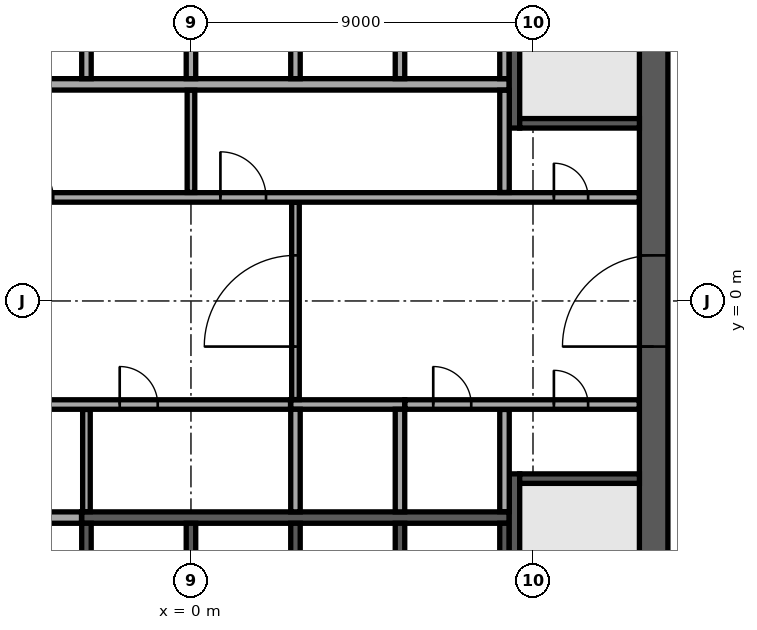
"""IFC4 building model, lengths in metres.
Left out: names, types, materials, properties, quantities, classifications, styles, units other than length and angle.
Written with IfcOpenShell. Run it as: python <this file> out.ifc"""

import sys

from ifc_helpers import new_model, si_unit, direction, frame, frame_2d, origin, place, context, subcontext, project, spatial, rectangle, extrude, element, fill, save


model = new_model("IFC4")
c1 = context("Model", 3, precision=1e-05, world=origin(), true_north=direction((0.0, 1.0)))
c2 = subcontext(c1, "Body", "Model", "MODEL_VIEW")
j1 = project(units=[si_unit("LENGTHUNIT", "METRE"), si_unit("PLANEANGLEUNIT", "RADIAN")], contexts=[c1])
p1 = place(None, origin())
s1 = spatial("IfcSite", under=j1, at=p1, CompositionType="ELEMENT")
p2 = place(p1, origin())
s2 = spatial("IfcBuilding", under=s1, at=p2, CompositionType="ELEMENT")
p3 = place(p2, frame((0.0, 0.0, 282.9)))
s3 = spatial("IfcBuildingStorey", under=s2, at=p3, CompositionType="ELEMENT", Elevation=282.9)
p4 = place(p3, frame((12.175, -11.8, 0.0), z_axis=(0.0, 0.0, 1.0), x_axis=(0.0, 1.0, 0.0)))
e1 = element("IfcWall", 1, at=p4, inside=s3, PredefinedType="SHEAR", context=c2, shape_type="SweptSolid", body=[
    extrude(rectangle(XDim=23.6, YDim=0.75, at=frame_2d((11.8, 0.0))), origin(), (0.0, 0.0, 1.0), 3.64),
])
p5 = place(p4, frame((10.6, 0.0, 0.0)))
e2 = element("IfcOpeningElement", 2, at=p5, cuts=e1, PredefinedType="OPENING", context=c2, shape_type="SweptSolid", body=[
    extrude(rectangle(XDim=2.4, YDim=2.4, at=frame_2d((1.2, 1.2))), frame((0.0, 0.385, 0.0), z_axis=(0.0, -1.0, 0.0), x_axis=(1.0, 0.0, 0.0)), (0.0, 0.0, 1.0), 0.77),
])
p6 = place(p3, frame((-8.375, 5.7, 0.0), z_axis=(0.0, 0.0, 1.0), x_axis=(1.0, 0.0, 0.0)))
e3 = element("IfcWall", 3, at=p6, inside=s3, PredefinedType="SOLIDWALL", context=c2, shape_type="SweptSolid", body=[
    extrude(rectangle(XDim=16.75, YDim=0.3, at=frame_2d((8.375, 0.0))), origin(), (0.0, 0.0, 1.0), 3.64),
])
p7 = place(p3, frame((-2.875, -5.7, 0.0), z_axis=(0.0, 0.0, 1.0), x_axis=(1.0, 0.0, 0.0)))
e4 = element("IfcWall", 4, at=p7, inside=s3, PredefinedType="SOLIDWALL", context=c2, shape_type="SweptSolid", body=[
    extrude(rectangle(XDim=11.25, YDim=0.3, at=frame_2d((5.625, 0.0))), origin(), (0.0, 0.0, 1.0), 3.64),
])
for number, where, z_axis, x_axis in (
    (5, (-2.75, 5.85, 0.0), (0.0, 0.0, 1.0), (0.0, 1.0, 0.0)),
    (6, (0.0, 5.85, 0.0), (0.0, 0.0, 1.0), (0.0, 1.0, 0.0)),
    (7, (2.75, 5.85, 0.0), (0.0, 0.0, 1.0), (0.0, 1.0, 0.0)),
    (8, (5.5, 5.85, 0.0), (0.0, 0.0, 1.0), (0.0, 1.0, 0.0)),
    (9, (8.25, 5.85, 0.0), (0.0, 0.0, 1.0), (0.0, 1.0, 0.0)),
):
    element("IfcWall", number, at=place(p3, frame(where, z_axis=z_axis, x_axis=x_axis)), inside=s3, PredefinedType="SOLIDWALL", context=c2, shape_type="SweptSolid", body=[
        extrude(rectangle(XDim=2.7, YDim=0.25, at=frame_2d((1.35, 0.0))), origin(), (0.0, 0.0, 1.0), 3.64),
    ])
p8 = place(p3, frame((2.625, -2.725, 0.0), z_axis=(0.0, 0.0, 1.0), x_axis=(1.0, 0.0, 0.0)))
e10 = element("IfcWall", 10, at=p8, inside=s3, PredefinedType="SOLIDWALL", context=c2, shape_type="SweptSolid", body=[
    extrude(rectangle(XDim=3.0, YDim=0.25, at=frame_2d((1.5, 0.0))), origin(), (0.0, 0.0, 1.0), 3.64),
])
for number, where, z_axis, x_axis in (
    (11, (2.75, -5.55, 0.0), (0.0, 0.0, 1.0), (0.0, 1.0, 0.0)),
    (12, (5.5, -5.55, 0.0), (0.0, 0.0, 1.0), (0.0, 1.0, 0.0)),
    (13, (-2.75, -8.55, 0.0), (0.0, 0.0, 1.0), (0.0, 1.0, 0.0)),
    (14, (0.0, -8.55, 0.0), (0.0, 0.0, 1.0), (0.0, 1.0, 0.0)),
    (15, (2.75, -8.55, 0.0), (0.0, 0.0, 1.0), (0.0, 1.0, 0.0)),
    (16, (5.5, -8.55, 0.0), (0.0, 0.0, 1.0), (0.0, 1.0, 0.0)),
    (17, (8.25, -8.55, 0.0), (0.0, 0.0, 1.0), (0.0, 1.0, 0.0)),
):
    element("IfcWall", number, at=place(p3, frame(where, z_axis=z_axis, x_axis=x_axis)), inside=s3, PredefinedType="SOLIDWALL", context=c2, shape_type="SweptSolid", body=[
        extrude(rectangle(XDim=2.7, YDim=0.25, at=frame_2d((1.35, 0.0))), origin(), (0.0, 0.0, 1.0), 3.64),
    ])
p9 = place(p3, frame((8.512, 4.55, 0.0), z_axis=(0.0, 0.0, 1.0), x_axis=(0.0, 1.0, 0.0)))
e18 = element("IfcWall", 18, at=p9, inside=s3, PredefinedType="SOLIDWALL", context=c2, shape_type="SweptSolid", body=[
    extrude(rectangle(XDim=7.25, YDim=0.275, at=frame_2d((3.625, 0.0))), origin(), (0.0, 0.0, 1.0), 3.64),
])
p10 = place(p9, frame((6.0, 0.0, 0.0)))
e19 = element("IfcOpeningElement", 19, at=p10, cuts=e18, PredefinedType="OPENING", context=c2, shape_type="SweptSolid", body=[
    extrude(rectangle(XDim=1.0, YDim=2.1, at=frame_2d((0.5, 1.05))), frame((0.0, 0.147, 0.0), z_axis=(0.0, -1.0, 0.0), x_axis=(1.0, 0.0, 0.0)), (0.0, 0.0, 1.0), 0.295),
])
p11 = place(p3, frame((8.65, 4.675, 0.0), z_axis=(0.0, 0.0, 1.0), x_axis=(1.0, 0.0, 0.0)))
e20 = element("IfcWall", 20, at=p11, inside=s3, PredefinedType="SOLIDWALL", context=c2, shape_type="SweptSolid", body=[
    extrude(rectangle(XDim=3.15, YDim=0.25, at=frame_2d((1.575, 0.0))), origin(), (0.0, 0.0, 1.0), 3.64),
])
p12 = place(p3, frame((8.512, -4.55, 0.0), z_axis=(0.0, 0.0, 1.0), x_axis=(0.0, -1.0, 0.0)))
e21 = element("IfcWall", 21, at=p12, inside=s3, PredefinedType="SOLIDWALL", context=c2, shape_type="SweptSolid", body=[
    extrude(rectangle(XDim=7.25, YDim=0.275, at=frame_2d((3.625, 0.0))), origin(), (0.0, 0.0, 1.0), 3.64),
])
p13 = place(p12, frame((6.0, 0.0, 0.0)))
e22 = element("IfcOpeningElement", 22, at=p13, cuts=e21, PredefinedType="OPENING", context=c2, shape_type="SweptSolid", body=[
    extrude(rectangle(XDim=1.0, YDim=2.1, at=frame_2d((0.5, 1.05))), frame((0.0, 0.147, 0.0), z_axis=(0.0, -1.0, 0.0), x_axis=(1.0, 0.0, 0.0)), (0.0, 0.0, 1.0), 0.295),
])
p14 = place(p3, frame((8.65, -4.675, 0.0), z_axis=(0.0, 0.0, 1.0), x_axis=(1.0, 0.0, 0.0)))
e23 = element("IfcWall", 23, at=p14, inside=s3, PredefinedType="SOLIDWALL", context=c2, shape_type="SweptSolid", body=[
    extrude(rectangle(XDim=3.15, YDim=0.25, at=frame_2d((1.575, 0.0))), origin(), (0.0, 0.0, 1.0), 3.64),
])
p15 = place(p3, frame((-8.35, -5.7, 0.0), z_axis=(0.0, 0.0, 1.0), x_axis=(1.0, 0.0, 0.0)))
e24 = element("IfcWall", 24, at=p15, inside=s3, PredefinedType="PARTITIONING", context=c2, shape_type="SweptSolid", body=[
    extrude(rectangle(XDim=5.47, YDim=0.3, at=frame_2d((2.735, 0.0))), origin(), (0.0, 0.0, 1.0), 3.64),
])
p16 = place(p3, frame((-2.75, -5.545, 0.0), z_axis=(0.0, 0.0, 1.0), x_axis=(0.0, 1.0, 0.0)))
e25 = element("IfcWall", 25, at=p16, inside=s3, PredefinedType="PARTITIONING", context=c2, shape_type="SweptSolid", body=[
    extrude(rectangle(XDim=2.69, YDim=0.2, at=frame_2d((1.345, 0.0))), origin(), (0.0, 0.0, 1.0), 3.64),
])
p17 = place(p3, frame((8.25, -5.545, 0.0), z_axis=(0.0, 0.0, 1.0), x_axis=(0.0, 1.0, 0.0)))
e26 = element("IfcWall", 26, at=p17, inside=s3, PredefinedType="PARTITIONING", context=c2, shape_type="SweptSolid", body=[
    extrude(rectangle(XDim=2.69, YDim=0.25, at=frame_2d((1.345, 0.0))), origin(), (0.0, 0.0, 1.0), 3.64),
])
p18 = place(p3, frame((-11.795, -2.725, 0.0), z_axis=(0.0, 0.0, 1.0), x_axis=(1.0, 0.0, 0.0)))
e27 = element("IfcWall", 27, at=p18, inside=s3, PredefinedType="PARTITIONING", context=c2, shape_type="SweptSolid", body=[
    extrude(rectangle(XDim=14.415, YDim=0.25, at=frame_2d((7.208, 0.0))), origin(), (0.0, 0.0, 1.0), 3.64),
])
p19 = place(p18, frame((1.295, 0.0, 0.0)))
e28 = element("IfcOpeningElement", 28, at=p19, cuts=e27, PredefinedType="OPENING", context=c2, shape_type="SweptSolid", body=[
    extrude(rectangle(XDim=1.0, YDim=2.1, at=frame_2d((0.5, 1.05))), frame((0.0, 0.135, 0.0), z_axis=(0.0, -1.0, 0.0), x_axis=(1.0, 0.0, 0.0)), (0.0, 0.0, 1.0), 0.27),
])
p20 = place(p18, frame((4.42, 0.0, 0.0)))
e29 = element("IfcOpeningElement", 29, at=p20, cuts=e27, PredefinedType="OPENING", context=c2, shape_type="SweptSolid", body=[
    extrude(rectangle(XDim=1.0, YDim=2.1, at=frame_2d((0.5, 1.05))), frame((0.0, 0.135, 0.0), z_axis=(0.0, -1.0, 0.0), x_axis=(1.0, 0.0, 0.0)), (0.0, 0.0, 1.0), 0.27),
])
p21 = place(p18, frame((9.92, 0.0, 0.0)))
e30 = element("IfcOpeningElement", 30, at=p21, cuts=e27, PredefinedType="OPENING", context=c2, shape_type="SweptSolid", body=[
    extrude(rectangle(XDim=1.0, YDim=2.1, at=frame_2d((0.5, 1.05))), frame((0.0, 0.135, 0.0), z_axis=(0.0, -1.0, 0.0), x_axis=(1.0, 0.0, 0.0)), (0.0, 0.0, 1.0), 0.27),
])
p22 = place(p3, frame((5.63, -2.725, 0.0), z_axis=(0.0, 0.0, 1.0), x_axis=(1.0, 0.0, 0.0)))
e31 = element("IfcWall", 31, at=p22, inside=s3, PredefinedType="PARTITIONING", context=c2, shape_type="SweptSolid", body=[
    extrude(rectangle(XDim=6.165, YDim=0.25, at=frame_2d((3.083, 0.0))), origin(), (0.0, 0.0, 1.0), 3.64),
])
p23 = place(p22, frame((0.745, 0.0, 0.0)))
e32 = element("IfcOpeningElement", 32, at=p23, cuts=e31, PredefinedType="OPENING", context=c2, shape_type="SweptSolid", body=[
    extrude(rectangle(XDim=1.0, YDim=2.1, at=frame_2d((0.5, 1.05))), frame((0.0, 0.135, 0.0), z_axis=(0.0, -1.0, 0.0), x_axis=(1.0, 0.0, 0.0)), (0.0, 0.0, 1.0), 0.27),
])
p24 = place(p22, frame((3.92, 0.0, 0.0)))
e33 = element("IfcOpeningElement", 33, at=p24, cuts=e31, PredefinedType="OPENING", context=c2, shape_type="SweptSolid", body=[
    extrude(rectangle(XDim=0.9, YDim=2.1, at=frame_2d((0.45, 1.05))), frame((0.0, 0.135, 0.0), z_axis=(0.0, -1.0, 0.0), x_axis=(1.0, 0.0, 0.0)), (0.0, 0.0, 1.0), 0.27),
])
p25 = place(p3, frame((2.75, -2.595, 0.0), z_axis=(0.0, 0.0, 1.0), x_axis=(0.0, 1.0, 0.0)))
e34 = element("IfcWall", 34, at=p25, inside=s3, PredefinedType="PARTITIONING", context=c2, shape_type="SweptSolid", body=[
    extrude(rectangle(XDim=5.19, YDim=0.2, at=frame_2d((2.595, 0.0))), origin(), (0.0, 0.0, 1.0), 3.64),
])
p26 = place(p25, frame((1.395, 0.0, 0.0)))
e35 = element("IfcOpeningElement", 35, at=p26, cuts=e34, PredefinedType="OPENING", context=c2, shape_type="SweptSolid", body=[
    extrude(rectangle(XDim=2.4, YDim=2.4, at=frame_2d((1.2, 1.2))), frame((0.0, 0.11, 0.0), z_axis=(0.0, -1.0, 0.0), x_axis=(1.0, 0.0, 0.0)), (0.0, 0.0, 1.0), 0.22),
])
p27 = place(p3, frame((-11.795, 2.725, 0.0), z_axis=(0.0, 0.0, 1.0), x_axis=(1.0, 0.0, 0.0)))
e36 = element("IfcWall", 36, at=p27, inside=s3, PredefinedType="PARTITIONING", context=c2, shape_type="SweptSolid", body=[
    extrude(rectangle(XDim=23.59, YDim=0.25, at=frame_2d((11.795, 0.0))), origin(), (0.0, 0.0, 1.0), 3.64),
])
p28 = place(p27, frame((21.345, 0.0, 0.0)))
e37 = element("IfcOpeningElement", 37, at=p28, cuts=e36, PredefinedType="OPENING", context=c2, shape_type="SweptSolid", body=[
    extrude(rectangle(XDim=0.9, YDim=2.1, at=frame_2d((0.45, 1.05))), frame((0.0, 0.135, 0.0), z_axis=(0.0, -1.0, 0.0), x_axis=(1.0, 0.0, 0.0)), (0.0, 0.0, 1.0), 0.27),
])
p29 = place(p27, frame((1.345, 0.0, 0.0)))
e38 = element("IfcOpeningElement", 38, at=p29, cuts=e36, PredefinedType="OPENING", context=c2, shape_type="SweptSolid", body=[
    extrude(rectangle(XDim=0.9, YDim=2.1, at=frame_2d((0.45, 1.05))), frame((0.0, 0.135, 0.0), z_axis=(0.0, -1.0, 0.0), x_axis=(1.0, 0.0, 0.0)), (0.0, 0.0, 1.0), 0.27),
])
p30 = place(p27, frame((4.42, 0.0, 0.0)))
e39 = element("IfcOpeningElement", 39, at=p30, cuts=e36, PredefinedType="OPENING", context=c2, shape_type="SweptSolid", body=[
    extrude(rectangle(XDim=1.0, YDim=2.1, at=frame_2d((0.5, 1.05))), frame((0.0, 0.135, 0.0), z_axis=(0.0, -1.0, 0.0), x_axis=(1.0, 0.0, 0.0)), (0.0, 0.0, 1.0), 0.27),
])
p31 = place(p27, frame((7.17, 0.0, 0.0)))
e40 = element("IfcOpeningElement", 40, at=p31, cuts=e36, PredefinedType="OPENING", context=c2, shape_type="SweptSolid", body=[
    extrude(rectangle(XDim=1.0, YDim=2.1, at=frame_2d((0.5, 1.05))), frame((0.0, 0.135, 0.0), z_axis=(0.0, -1.0, 0.0), x_axis=(1.0, 0.0, 0.0)), (0.0, 0.0, 1.0), 0.27),
])
p32 = place(p27, frame((12.57, 0.0, 0.0)))
e41 = element("IfcOpeningElement", 41, at=p32, cuts=e36, PredefinedType="OPENING", context=c2, shape_type="SweptSolid", body=[
    extrude(rectangle(XDim=1.2, YDim=2.1, at=frame_2d((0.6, 1.05))), frame((0.0, 0.135, 0.0), z_axis=(0.0, -1.0, 0.0), x_axis=(1.0, 0.0, 0.0)), (0.0, 0.0, 1.0), 0.27),
])
p33 = place(p3, frame((0.0, 2.855, 0.0), z_axis=(0.0, 0.0, 1.0), x_axis=(0.0, 1.0, 0.0)))
e42 = element("IfcWall", 42, at=p33, inside=s3, PredefinedType="PARTITIONING", context=c2, shape_type="SweptSolid", body=[
    extrude(rectangle(XDim=2.69, YDim=0.2, at=frame_2d((1.345, 0.0))), origin(), (0.0, 0.0, 1.0), 3.64),
])
p34 = place(p3, frame((8.25, 2.855, 0.0), z_axis=(0.0, 0.0, 1.0), x_axis=(0.0, 1.0, 0.0)))
e43 = element("IfcWall", 43, at=p34, inside=s3, PredefinedType="PARTITIONING", context=c2, shape_type="SweptSolid", body=[
    extrude(rectangle(XDim=2.69, YDim=0.25, at=frame_2d((1.345, 0.0))), origin(), (0.0, 0.0, 1.0), 3.64),
])
p35 = place(p3, frame((10.36, -32.137, 0.0), z_axis=(0.0, 0.0, 1.0), x_axis=(0.438372256832, 0.898793504894, 0.0)))
e44 = element("IfcWall", 44, at=p35, inside=s3, PredefinedType="STANDARD", context=c2, shape_type="SweptSolid", body=[
    extrude(rectangle(XDim=48.687, YDim=0.6, at=frame_2d((24.343, 0.0))), origin(), (0.0, 0.0, 1.0), 3.64),
])
p36 = place(p35, frame((1.213, 0.0, 0.9)))
e45 = element("IfcOpeningElement", 45, at=p36, cuts=e44, PredefinedType="OPENING", context=c2, shape_type="SweptSolid", body=[
    extrude(rectangle(XDim=2.0, YDim=2.1, at=frame_2d((1.0, 1.05))), frame((0.0, 0.31, 0.0), z_axis=(0.0, -1.0, 0.0), x_axis=(1.0, 0.0, 0.0)), (0.0, 0.0, 1.0), 0.62),
])
p37 = place(p35, frame((5.639, 0.0, 0.9)))
e46 = element("IfcOpeningElement", 46, at=p37, cuts=e44, PredefinedType="OPENING", context=c2, shape_type="SweptSolid", body=[
    extrude(rectangle(XDim=2.0, YDim=2.1, at=frame_2d((1.0, 1.05))), frame((0.0, 0.31, 0.0), z_axis=(0.0, -1.0, 0.0), x_axis=(1.0, 0.0, 0.0)), (0.0, 0.0, 1.0), 0.62),
])
p38 = place(p35, frame((10.065, 0.0, 0.9)))
e47 = element("IfcOpeningElement", 47, at=p38, cuts=e44, PredefinedType="OPENING", context=c2, shape_type="SweptSolid", body=[
    extrude(rectangle(XDim=2.0, YDim=2.1, at=frame_2d((1.0, 1.05))), frame((0.0, 0.31, 0.0), z_axis=(0.0, -1.0, 0.0), x_axis=(1.0, 0.0, 0.0)), (0.0, 0.0, 1.0), 0.62),
])
p39 = place(p35, frame((14.491, 0.0, 0.9)))
e48 = element("IfcOpeningElement", 48, at=p39, cuts=e44, PredefinedType="OPENING", context=c2, shape_type="SweptSolid", body=[
    extrude(rectangle(XDim=2.0, YDim=2.1, at=frame_2d((1.0, 1.05))), frame((0.0, 0.31, 0.0), z_axis=(0.0, -1.0, 0.0), x_axis=(1.0, 0.0, 0.0)), (0.0, 0.0, 1.0), 0.62),
])
p40 = place(p35, frame((18.917, 0.0, 0.9)))
e49 = element("IfcOpeningElement", 49, at=p40, cuts=e44, PredefinedType="OPENING", context=c2, shape_type="SweptSolid", body=[
    extrude(rectangle(XDim=2.0, YDim=2.1, at=frame_2d((1.0, 1.05))), frame((0.0, 0.31, 0.0), z_axis=(0.0, -1.0, 0.0), x_axis=(1.0, 0.0, 0.0)), (0.0, 0.0, 1.0), 0.62),
])
p41 = place(p35, frame((23.343, 0.0, 0.9)))
e50 = element("IfcOpeningElement", 50, at=p41, cuts=e44, PredefinedType="OPENING", context=c2, shape_type="SweptSolid", body=[
    extrude(rectangle(XDim=2.0, YDim=2.1, at=frame_2d((1.0, 1.05))), frame((0.0, 0.31, 0.0), z_axis=(0.0, -1.0, 0.0), x_axis=(1.0, 0.0, 0.0)), (0.0, 0.0, 1.0), 0.62),
])
p42 = place(p35, frame((27.769, 0.0, 0.9)))
e51 = element("IfcOpeningElement", 51, at=p42, cuts=e44, PredefinedType="OPENING", context=c2, shape_type="SweptSolid", body=[
    extrude(rectangle(XDim=2.0, YDim=2.1, at=frame_2d((1.0, 1.05))), frame((0.0, 0.31, 0.0), z_axis=(0.0, -1.0, 0.0), x_axis=(1.0, 0.0, 0.0)), (0.0, 0.0, 1.0), 0.62),
])
p43 = place(p35, frame((32.195, 0.0, 0.9)))
e52 = element("IfcOpeningElement", 52, at=p43, cuts=e44, PredefinedType="OPENING", context=c2, shape_type="SweptSolid", body=[
    extrude(rectangle(XDim=2.0, YDim=2.1, at=frame_2d((1.0, 1.05))), frame((0.0, 0.31, 0.0), z_axis=(0.0, -1.0, 0.0), x_axis=(1.0, 0.0, 0.0)), (0.0, 0.0, 1.0), 0.62),
])
p44 = place(p35, frame((36.621, 0.0, 0.9)))
e53 = element("IfcOpeningElement", 53, at=p44, cuts=e44, PredefinedType="OPENING", context=c2, shape_type="SweptSolid", body=[
    extrude(rectangle(XDim=2.0, YDim=2.1, at=frame_2d((1.0, 1.05))), frame((0.0, 0.31, 0.0), z_axis=(0.0, -1.0, 0.0), x_axis=(1.0, 0.0, 0.0)), (0.0, 0.0, 1.0), 0.62),
])
p45 = place(p35, frame((41.047, 0.0, 0.9)))
e54 = element("IfcOpeningElement", 54, at=p45, cuts=e44, PredefinedType="OPENING", context=c2, shape_type="SweptSolid", body=[
    extrude(rectangle(XDim=2.0, YDim=2.1, at=frame_2d((1.0, 1.05))), frame((0.0, 0.31, 0.0), z_axis=(0.0, -1.0, 0.0), x_axis=(1.0, 0.0, 0.0)), (0.0, 0.0, 1.0), 0.62),
])
p46 = place(p35, frame((45.473, 0.0, 0.9)))
e55 = element("IfcOpeningElement", 55, at=p46, cuts=e44, PredefinedType="OPENING", context=c2, shape_type="SweptSolid", body=[
    extrude(rectangle(XDim=2.0, YDim=2.1, at=frame_2d((1.0, 1.05))), frame((0.0, 0.31, 0.0), z_axis=(0.0, -1.0, 0.0), x_axis=(1.0, 0.0, 0.0)), (0.0, 0.0, 1.0), 0.62),
])
p47 = place(p5, origin())
e56 = element("IfcDoor", 56, at=p47, inside=s3, OperationType="SINGLE_SWING_LEFT", PredefinedType="DOOR", context=c2, shape_type="SweptSolid", body=[
    extrude(rectangle(XDim=2.4, YDim=2.4, at=frame_2d((1.2, 1.2))), frame((0.0, 0.025, 0.0), z_axis=(0.0, -1.0, 0.0), x_axis=(1.0, 0.0, 0.0)), (0.0, 0.0, 1.0), 0.05),
])
fill(e2, e56)
p48 = place(p23, origin())
e57 = element("IfcDoor", 57, at=p48, inside=s3, OperationType="SINGLE_SWING_RIGHT", PredefinedType="DOOR", context=c2, shape_type="SweptSolid", body=[
    extrude(rectangle(XDim=1.0, YDim=2.1, at=frame_2d((0.5, 1.05))), frame((0.0, 0.025, 0.0), z_axis=(0.0, -1.0, 0.0), x_axis=(1.0, 0.0, 0.0)), (0.0, 0.0, 1.0), 0.05),
])
fill(e32, e57)
p49 = place(p28, origin())
e58 = element("IfcDoor", 58, at=p49, inside=s3, OperationType="SINGLE_SWING_RIGHT", PredefinedType="DOOR", context=c2, shape_type="SweptSolid", body=[
    extrude(rectangle(XDim=0.9, YDim=2.1, at=frame_2d((0.45, 1.05))), frame((0.0, 0.025, 0.0), z_axis=(0.0, -1.0, 0.0), x_axis=(1.0, 0.0, 0.0)), (0.0, 0.0, 1.0), 0.05),
])
fill(e37, e58)
p50 = place(p24, origin())
e59 = element("IfcDoor", 59, at=p50, inside=s3, OperationType="SINGLE_SWING_RIGHT", PredefinedType="DOOR", context=c2, shape_type="SweptSolid", body=[
    extrude(rectangle(XDim=0.9, YDim=2.1, at=frame_2d((0.45, 1.05))), frame((0.0, 0.025, 0.0), z_axis=(0.0, -1.0, 0.0), x_axis=(1.0, 0.0, 0.0)), (0.0, 0.0, 1.0), 0.05),
])
fill(e33, e59)
p51 = place(p31, origin())
e60 = element("IfcDoor", 60, at=p51, inside=s3, OperationType="SINGLE_SWING_RIGHT", PredefinedType="DOOR", context=c2, shape_type="SweptSolid", body=[
    extrude(rectangle(XDim=1.0, YDim=2.1, at=frame_2d((0.5, 1.05))), frame((0.0, 0.025, 0.0), z_axis=(0.0, -1.0, 0.0), x_axis=(1.0, 0.0, 0.0)), (0.0, 0.0, 1.0), 0.05),
])
fill(e40, e60)
p52 = place(p32, origin())
e61 = element("IfcDoor", 61, at=p52, inside=s3, OperationType="SINGLE_SWING_LEFT", PredefinedType="DOOR", context=c2, shape_type="SweptSolid", body=[
    extrude(rectangle(XDim=1.2, YDim=2.1, at=frame_2d((0.6, 1.05))), frame((0.0, 0.025, 0.0), z_axis=(0.0, -1.0, 0.0), x_axis=(1.0, 0.0, 0.0)), (0.0, 0.0, 1.0), 0.05),
])
fill(e41, e61)
p53 = place(p21, origin())
e62 = element("IfcDoor", 62, at=p53, inside=s3, OperationType="SINGLE_SWING_RIGHT", PredefinedType="DOOR", context=c2, shape_type="SweptSolid", body=[
    extrude(rectangle(XDim=1.0, YDim=2.1, at=frame_2d((0.5, 1.05))), frame((0.0, 0.025, 0.0), z_axis=(0.0, -1.0, 0.0), x_axis=(1.0, 0.0, 0.0)), (0.0, 0.0, 1.0), 0.05),
])
fill(e30, e62)
p54 = place(p26, origin())
e63 = element("IfcDoor", 63, at=p54, inside=s3, OperationType="DOUBLE_DOOR_DOUBLE_SWING", PredefinedType="DOOR", context=c2, shape_type="SweptSolid", body=[
    extrude(rectangle(XDim=2.4, YDim=2.4, at=frame_2d((1.2, 1.2))), frame((0.0, 0.025, 0.0), z_axis=(0.0, -1.0, 0.0), x_axis=(1.0, 0.0, 0.0)), (0.0, 0.0, 1.0), 0.05),
])
fill(e35, e63)
save(model, sys.argv[1])
